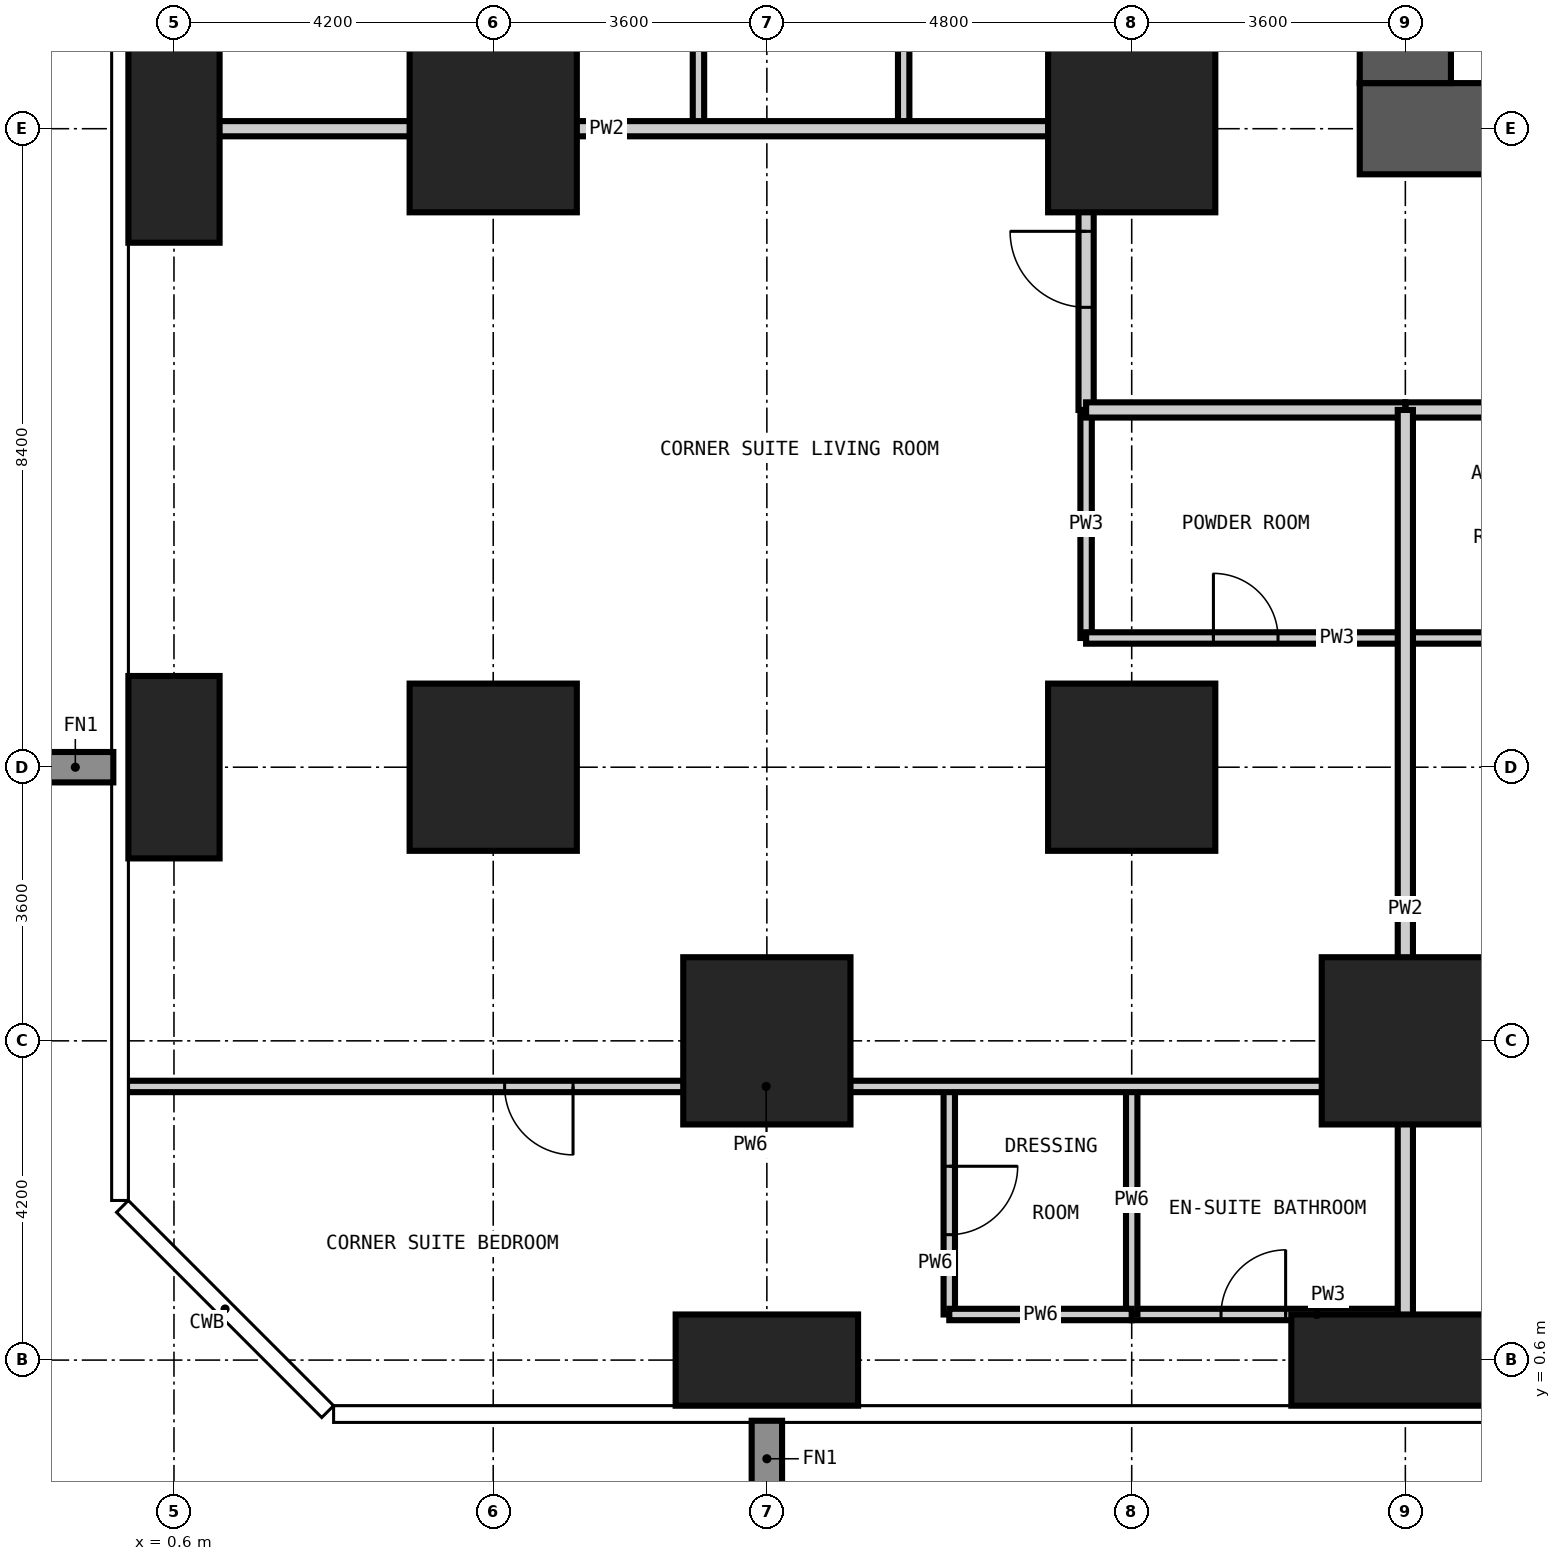
"""IFC4 building model, lengths in metres.
Left out: names, types, materials, properties, quantities, classifications, styles, units other than length and angle.
Written with IfcOpenShell. Run it as: python <this file> out.ifc"""

import sys

from ifc_helpers import new_model, si_unit, direction, frame, frame_2d, origin, origin_2d, place, context, subcontext, project, spatial, rectangle, extrude, element, fill, save


model = new_model("IFC4")
c1 = context("Model", 3, precision=1e-05, world=origin(), true_north=direction((0.0, 1.0)))
c2 = subcontext(c1, "Body", "Model", "MODEL_VIEW")
j1 = project(units=[si_unit("LENGTHUNIT", "METRE"), si_unit("PLANEANGLEUNIT", "RADIAN")], contexts=[c1])
p1 = place(None, origin())
s1 = spatial("IfcSite", under=j1, at=p1, CompositionType="ELEMENT")
p2 = place(p1, origin())
s2 = spatial("IfcBuilding", under=s1, at=p2, CompositionType="ELEMENT")
p3 = place(p2, frame((0.0, 0.0, 144.0)))
s3 = spatial("IfcBuildingStorey", under=s2, at=p3, CompositionType="ELEMENT", Elevation=144.0)
p4 = place(p3, frame((0.6, 8.4, -0.35), z_axis=(0.0, 0.0, 1.0), x_axis=(1.0, 0.0, 0.0)))
e1 = element("IfcColumn", 1, at=p4, inside=s3, PredefinedType="COLUMN", context=c2, shape_type="SweptSolid", body=[
    extrude(rectangle(XDim=1.2, YDim=2.4, at=origin_2d()), origin(), (0.0, 0.0, 1.0), 3.6),
])
p5 = place(p3, frame((0.6, 16.8, -0.35), z_axis=(0.0, 0.0, 1.0), x_axis=(1.0, 0.0, 0.0)))
e2 = element("IfcColumn", 2, at=p5, inside=s3, PredefinedType="COLUMN", context=c2, shape_type="SweptSolid", body=[
    extrude(rectangle(XDim=1.2, YDim=3.0, at=origin_2d()), origin(), (0.0, 0.0, 1.0), 3.6),
])
for number, where, z_axis, x_axis in (
    (3, (4.8, 8.4, -0.35), (0.0, 0.0, 1.0), (1.0, 0.0, 0.0)),
    (4, (4.8, 16.8, -0.35), (0.0, 0.0, 1.0), (1.0, 0.0, 0.0)),
):
    element("IfcColumn", number, at=place(p3, frame(where, z_axis=z_axis, x_axis=x_axis)), inside=s3, PredefinedType="COLUMN", context=c2, shape_type="SweptSolid", body=[
        extrude(rectangle(XDim=2.2, YDim=2.2, at=origin_2d()), origin(), (0.0, 0.0, 1.0), 3.6),
    ])
p6 = place(p3, frame((8.4, 0.6, -0.35), z_axis=(0.0, 0.0, 1.0), x_axis=(1.0, 0.0, 0.0)))
e5 = element("IfcColumn", 5, at=p6, inside=s3, PredefinedType="COLUMN", context=c2, shape_type="SweptSolid", body=[
    extrude(rectangle(XDim=2.4, YDim=1.2, at=origin_2d()), origin(), (0.0, 0.0, 1.0), 3.6),
])
for number, where, z_axis, x_axis in (
    (6, (8.4, 4.8, -0.35), (0.0, 0.0, 1.0), (1.0, 0.0, 0.0)),
    (7, (13.2, 8.4, -0.35), (0.0, 0.0, 1.0), (1.0, 0.0, 0.0)),
    (8, (13.2, 16.8, -0.35), (0.0, 0.0, 1.0), (1.0, 0.0, 0.0)),
):
    element("IfcColumn", number, at=place(p3, frame(where, z_axis=z_axis, x_axis=x_axis)), inside=s3, PredefinedType="COLUMN", context=c2, shape_type="SweptSolid", body=[
        extrude(rectangle(XDim=2.2, YDim=2.2, at=origin_2d()), origin(), (0.0, 0.0, 1.0), 3.6),
    ])
p7 = place(p3, frame((16.8, 0.6, -0.35), z_axis=(0.0, 0.0, 1.0), x_axis=(1.0, 0.0, 0.0)))
e9 = element("IfcColumn", 9, at=p7, inside=s3, PredefinedType="COLUMN", context=c2, shape_type="SweptSolid", body=[
    extrude(rectangle(XDim=3.0, YDim=1.2, at=origin_2d()), origin(), (0.0, 0.0, 1.0), 3.6),
])
p8 = place(p3, frame((16.8, 4.8, -0.35), z_axis=(0.0, 0.0, 1.0), x_axis=(1.0, 0.0, 0.0)))
e10 = element("IfcColumn", 10, at=p8, inside=s3, PredefinedType="COLUMN", context=c2, shape_type="SweptSolid", body=[
    extrude(rectangle(XDim=2.2, YDim=2.2, at=origin_2d()), origin(), (0.0, 0.0, 1.0), 3.6),
])
p9 = place(p3, frame((16.2, 16.8, -0.35), z_axis=(0.0, 0.0, 1.0), x_axis=(1.0, 0.0, 0.0)))
e11 = element("IfcWall", 11, at=p9, inside=s3, PredefinedType="SHEAR", context=c2, shape_type="SweptSolid", body=[
    extrude(rectangle(XDim=26.4, YDim=1.2, at=frame_2d((13.2, 0.0))), origin(), (0.0, 0.0, 1.0), 3.6),
])
p10 = place(p9, frame((12.7, 0.0, 0.35)))
e12 = element("IfcOpeningElement", 12, at=p10, cuts=e11, PredefinedType="OPENING", context=c2, shape_type="SweptSolid", body=[
    extrude(rectangle(XDim=1.0, YDim=2.1, at=frame_2d((0.5, 1.05))), frame((0.0, 0.61, 0.0), z_axis=(0.0, -1.0, 0.0), x_axis=(1.0, 0.0, 0.0)), (0.0, 0.0, 1.0), 1.22),
])
p11 = place(p9, frame((19.0, 0.0, 0.35)))
e13 = element("IfcOpeningElement", 13, at=p11, cuts=e11, PredefinedType="OPENING", context=c2, shape_type="SweptSolid", body=[
    extrude(rectangle(XDim=1.0, YDim=2.1, at=frame_2d((0.5, 1.05))), frame((0.0, 0.61, 0.0), z_axis=(0.0, -1.0, 0.0), x_axis=(1.0, 0.0, 0.0)), (0.0, 0.0, 1.0), 1.22),
])
p12 = place(p3, frame((16.8, 41.4, -0.35), z_axis=(0.0, 0.0, 1.0), x_axis=(0.0, -1.0, 0.0)))
e14 = element("IfcWall", 14, at=p12, inside=s3, PredefinedType="SHEAR", context=c2, shape_type="SweptSolid", body=[
    extrude(rectangle(XDim=24.0, YDim=1.2, at=frame_2d((12.0, 0.0))), origin(), (0.0, 0.0, 1.0), 3.6),
])
p13 = place(p12, frame((11.1, 0.0, 0.35)))
e15 = element("IfcOpeningElement", 15, at=p13, cuts=e14, PredefinedType="OPENING", context=c2, shape_type="SweptSolid", body=[
    extrude(rectangle(XDim=1.8, YDim=2.2, at=frame_2d((0.9, 1.1))), frame((0.0, 0.61, 0.0), z_axis=(0.0, -1.0, 0.0), x_axis=(1.0, 0.0, 0.0)), (0.0, 0.0, 1.0), 1.22),
])
p14 = place(p12, frame((19.9, 0.0, 0.35)))
e16 = element("IfcOpeningElement", 16, at=p14, cuts=e14, PredefinedType="OPENING", context=c2, shape_type="SweptSolid", body=[
    extrude(rectangle(XDim=1.0, YDim=2.1, at=frame_2d((0.5, 1.05))), frame((0.0, 0.61, 0.0), z_axis=(0.0, -1.0, 0.0), x_axis=(1.0, 0.0, 0.0)), (0.0, 0.0, 1.0), 1.22),
])
p15 = place(p12, frame((5.2, 0.0, 0.35)))
e17 = element("IfcOpeningElement", 17, at=p15, cuts=e14, PredefinedType="OPENING", context=c2, shape_type="SweptSolid", body=[
    extrude(rectangle(XDim=1.0, YDim=2.1, at=frame_2d((0.5, 1.05))), frame((0.0, 0.61, 0.0), z_axis=(0.0, -1.0, 0.0), x_axis=(1.0, 0.0, 0.0)), (0.0, 0.0, 1.0), 1.22),
])
p16 = place(p3, frame((7.5, 16.8, 0.0), z_axis=(0.0, 0.0, 1.0), x_axis=(0.0, 1.0, 0.0)))
e18 = element("IfcWall", 18, at=p16, inside=s3, PredefinedType="PARTITIONING", context=c2, shape_type="SweptSolid", body=[
    extrude(rectangle(XDim=3.0, YDim=0.15, at=frame_2d((1.5, 0.0))), origin(), (0.0, 0.0, 1.0), 3.25),
])
p17 = place(p3, frame((10.2, 16.8, 0.0), z_axis=(0.0, 0.0, 1.0), x_axis=(0.0, 1.0, 0.0)))
e19 = element("IfcWall", 19, at=p17, inside=s3, PredefinedType="PARTITIONING", context=c2, shape_type="SweptSolid", body=[
    extrude(rectangle(XDim=3.0, YDim=0.15, at=frame_2d((1.5, 0.0))), origin(), (0.0, 0.0, 1.0), 3.25),
])
p18 = place(p17, frame((1.075, 0.0, 0.0)))
e20 = element("IfcOpeningElement", 20, at=p18, cuts=e19, PredefinedType="OPENING", context=c2, shape_type="SweptSolid", body=[
    extrude(rectangle(XDim=0.85, YDim=2.1, at=frame_2d((0.425, 1.05))), frame((0.0, 0.085, 0.0), z_axis=(0.0, -1.0, 0.0), x_axis=(1.0, 0.0, 0.0)), (0.0, 0.0, 1.0), 0.17),
])
p19 = place(p3, frame((12.6, 10.1, 0.0), z_axis=(0.0, 0.0, 1.0), x_axis=(0.0, 1.0, 0.0)))
e21 = element("IfcWall", 21, at=p19, inside=s3, PredefinedType="PARTITIONING", context=c2, shape_type="SweptSolid", body=[
    extrude(rectangle(XDim=3.0, YDim=0.15, at=frame_2d((1.5, 0.0))), origin(), (0.0, 0.0, 1.0), 3.25),
])
p20 = place(p3, frame((13.2, 1.2, 0.0), z_axis=(0.0, 0.0, 1.0), x_axis=(1.0, 0.0, 0.0)))
e22 = element("IfcWall", 22, at=p20, inside=s3, PredefinedType="PARTITIONING", context=c2, shape_type="SweptSolid", body=[
    extrude(rectangle(XDim=3.6, YDim=0.15, at=frame_2d((1.8, 0.0))), origin(), (0.0, 0.0, 1.0), 3.25),
])
p21 = place(p20, frame((1.175, 0.0, 0.0)))
e23 = element("IfcOpeningElement", 23, at=p21, cuts=e22, PredefinedType="OPENING", context=c2, shape_type="SweptSolid", body=[
    extrude(rectangle(XDim=0.85, YDim=2.1, at=frame_2d((0.425, 1.05))), frame((0.0, 0.085, 0.0), z_axis=(0.0, -1.0, 0.0), x_axis=(1.0, 0.0, 0.0)), (0.0, 0.0, 1.0), 0.17),
])
p22 = place(p3, frame((12.6, 10.1, 0.0), z_axis=(0.0, 0.0, 1.0), x_axis=(1.0, 0.0, 0.0)))
e24 = element("IfcWall", 24, at=p22, inside=s3, PredefinedType="PARTITIONING", context=c2, shape_type="SweptSolid", body=[
    extrude(rectangle(XDim=6.6, YDim=0.15, at=frame_2d((3.3, 0.0))), origin(), (0.0, 0.0, 1.0), 3.25),
])
p23 = place(p22, frame((1.675, 0.0, 0.0)))
e25 = element("IfcOpeningElement", 25, at=p23, cuts=e24, PredefinedType="OPENING", context=c2, shape_type="SweptSolid", body=[
    extrude(rectangle(XDim=0.85, YDim=2.1, at=frame_2d((0.425, 1.05))), frame((0.0, 0.085, 0.0), z_axis=(0.0, -1.0, 0.0), x_axis=(1.0, 0.0, 0.0)), (0.0, 0.0, 1.0), 0.17),
])
p24 = place(p3, frame((12.6, 13.1, 0.0), z_axis=(0.0, 0.0, 1.0), x_axis=(0.0, 1.0, 0.0)))
e26 = element("IfcWall", 26, at=p24, inside=s3, PredefinedType="PARTITIONING", context=c2, shape_type="SweptSolid", body=[
    extrude(rectangle(XDim=31.4, YDim=0.2, at=frame_2d((15.7, 0.0))), origin(), (0.0, 0.0, 1.0), 3.25),
])
p25 = place(p24, frame((5.3, 0.0, 0.0)))
e27 = element("IfcOpeningElement", 27, at=p25, cuts=e26, PredefinedType="OPENING", context=c2, shape_type="SweptSolid", body=[
    extrude(rectangle(XDim=1.0, YDim=2.2, at=frame_2d((0.5, 1.1))), frame((0.0, 0.11, 0.0), z_axis=(0.0, -1.0, 0.0), x_axis=(1.0, 0.0, 0.0)), (0.0, 0.0, 1.0), 0.22),
])
p26 = place(p24, frame((13.3, 0.0, 0.0)))
e28 = element("IfcOpeningElement", 28, at=p26, cuts=e26, PredefinedType="OPENING", context=c2, shape_type="SweptSolid", body=[
    extrude(rectangle(XDim=1.0, YDim=2.2, at=frame_2d((0.5, 1.1))), frame((0.0, 0.11, 0.0), z_axis=(0.0, -1.0, 0.0), x_axis=(1.0, 0.0, 0.0)), (0.0, 0.0, 1.0), 0.22),
])
p27 = place(p24, frame((18.3, 0.0, 0.0)))
e29 = element("IfcOpeningElement", 29, at=p27, cuts=e26, PredefinedType="OPENING", context=c2, shape_type="SweptSolid", body=[
    extrude(rectangle(XDim=1.0, YDim=2.2, at=frame_2d((0.5, 1.1))), frame((0.0, 0.11, 0.0), z_axis=(0.0, -1.0, 0.0), x_axis=(1.0, 0.0, 0.0)), (0.0, 0.0, 1.0), 0.22),
])
p28 = place(p24, frame((26.3, 0.0, 0.0)))
e30 = element("IfcOpeningElement", 30, at=p28, cuts=e26, PredefinedType="OPENING", context=c2, shape_type="SweptSolid", body=[
    extrude(rectangle(XDim=1.0, YDim=2.2, at=frame_2d((0.5, 1.1))), frame((0.0, 0.11, 0.0), z_axis=(0.0, -1.0, 0.0), x_axis=(1.0, 0.0, 0.0)), (0.0, 0.0, 1.0), 0.22),
])
p29 = place(p24, frame((1.35, 0.0, 0.0)))
e31 = element("IfcOpeningElement", 31, at=p29, cuts=e26, PredefinedType="OPENING", context=c2, shape_type="SweptSolid", body=[
    extrude(rectangle(XDim=1.0, YDim=2.2, at=frame_2d((0.5, 1.1))), frame((0.0, 0.11, 0.0), z_axis=(0.0, -1.0, 0.0), x_axis=(1.0, 0.0, 0.0)), (0.0, 0.0, 1.0), 0.22),
])
p30 = place(p24, frame((30.05, 0.0, 0.0)))
e32 = element("IfcOpeningElement", 32, at=p30, cuts=e26, PredefinedType="OPENING", context=c2, shape_type="SweptSolid", body=[
    extrude(rectangle(XDim=1.0, YDim=2.2, at=frame_2d((0.5, 1.1))), frame((0.0, 0.11, 0.0), z_axis=(0.0, -1.0, 0.0), x_axis=(1.0, 0.0, 0.0)), (0.0, 0.0, 1.0), 0.22),
])
p31 = place(p3, frame((16.8, 13.1, 0.0), z_axis=(0.0, 0.0, 1.0), x_axis=(1.0, 0.0, 0.0)))
e33 = element("IfcWall", 33, at=p31, inside=s3, PredefinedType="PARTITIONING", context=c2, shape_type="SweptSolid", body=[
    extrude(rectangle(XDim=4.2, YDim=0.2, at=frame_2d((2.1, 0.0))), origin(), (0.0, 0.0, 1.0), 3.25),
])
p32 = place(p31, frame((2.8, 0.0, 0.0)))
e34 = element("IfcOpeningElement", 34, at=p32, cuts=e33, PredefinedType="OPENING", context=c2, shape_type="SweptSolid", body=[
    extrude(rectangle(XDim=1.0, YDim=2.2, at=frame_2d((0.5, 1.1))), frame((0.0, 0.11, 0.0), z_axis=(0.0, -1.0, 0.0), x_axis=(1.0, 0.0, 0.0)), (0.0, 0.0, 1.0), 0.22),
])
p33 = place(p3, frame((16.8, 13.1, 0.0), z_axis=(0.0, 0.0, 1.0), x_axis=(-1.0, 0.0, 0.0)))
e35 = element("IfcWall", 35, at=p33, inside=s3, PredefinedType="PARTITIONING", context=c2, shape_type="SweptSolid", body=[
    extrude(rectangle(XDim=4.2, YDim=0.2, at=frame_2d((2.1, 0.0))), origin(), (0.0, 0.0, 1.0), 3.25),
])
p34 = place(p3, frame((16.8, -0.018, 0.0), z_axis=(0.0, 0.0, 1.0), x_axis=(0.0, 1.0, 0.0)))
e36 = element("IfcWall", 36, at=p34, inside=s3, PredefinedType="PARTITIONING", context=c2, shape_type="SweptSolid", body=[
    extrude(rectangle(XDim=13.118, YDim=0.2, at=frame_2d((6.559, 0.0))), origin(), (0.0, 0.0, 1.0), 3.25),
])
p35 = place(p3, frame((-0.018, 16.8, 0.0), z_axis=(0.0, 0.0, 1.0), x_axis=(1.0, 0.0, 0.0)))
e37 = element("IfcWall", 37, at=p35, inside=s3, PredefinedType="PARTITIONING", context=c2, shape_type="SweptSolid", body=[
    extrude(rectangle(XDim=12.618, YDim=0.2, at=frame_2d((6.309, 0.0))), origin(), (0.0, 0.0, 1.0), 3.25),
])
p36 = place(p3, frame((10.8, 1.2, 0.0), z_axis=(0.0, 0.0, 1.0), x_axis=(0.0, 1.0, 0.0)))
e38 = element("IfcWall", 38, at=p36, inside=s3, PredefinedType="PARTITIONING", context=c2, shape_type="SweptSolid", body=[
    extrude(rectangle(XDim=3.0, YDim=0.15, at=frame_2d((1.5, 0.0))), origin(), (0.0, 0.0, 1.0), 3.25),
])
p37 = place(p36, frame((1.05, 0.0, 0.0)))
e39 = element("IfcOpeningElement", 39, at=p37, cuts=e38, PredefinedType="OPENING", context=c2, shape_type="SweptSolid", body=[
    extrude(rectangle(XDim=0.9, YDim=2.1, at=frame_2d((0.45, 1.05))), frame((0.0, 0.085, 0.0), z_axis=(0.0, -1.0, 0.0), x_axis=(1.0, 0.0, 0.0)), (0.0, 0.0, 1.0), 0.17),
])
p38 = place(p3, frame((13.2, 1.2, 0.0), z_axis=(0.0, 0.0, 1.0), x_axis=(0.0, 1.0, 0.0)))
e40 = element("IfcWall", 40, at=p38, inside=s3, PredefinedType="PARTITIONING", context=c2, shape_type="SweptSolid", body=[
    extrude(rectangle(XDim=3.0, YDim=0.15, at=frame_2d((1.5, 0.0))), origin(), (0.0, 0.0, 1.0), 3.25),
])
p39 = place(p3, frame((10.8, 1.2, 0.0), z_axis=(0.0, 0.0, 1.0), x_axis=(1.0, 0.0, 0.0)))
e41 = element("IfcWall", 41, at=p39, inside=s3, PredefinedType="PARTITIONING", context=c2, shape_type="SweptSolid", body=[
    extrude(rectangle(XDim=2.4, YDim=0.15, at=frame_2d((1.2, 0.0))), origin(), (0.0, 0.0, 1.0), 3.25),
])
p40 = place(p3, frame((-0.018, 4.2, 0.0), z_axis=(0.0, 0.0, 1.0), x_axis=(1.0, 0.0, 0.0)))
e42 = element("IfcWall", 42, at=p40, inside=s3, PredefinedType="PARTITIONING", context=c2, shape_type="SweptSolid", body=[
    extrude(rectangle(XDim=16.818, YDim=0.15, at=frame_2d((8.409, 0.0))), origin(), (0.0, 0.0, 1.0), 3.25),
])
p41 = place(p40, frame((4.968, 0.0, 0.0)))
e43 = element("IfcOpeningElement", 43, at=p41, cuts=e42, PredefinedType="OPENING", context=c2, shape_type="SweptSolid", body=[
    extrude(rectangle(XDim=0.9, YDim=2.1, at=frame_2d((0.45, 1.05))), frame((0.0, 0.085, 0.0), z_axis=(0.0, -1.0, 0.0), x_axis=(1.0, 0.0, 0.0)), (0.0, 0.0, 1.0), 0.17),
])
p42 = place(p29, origin())
e44 = element("IfcDoor", 44, at=p42, inside=s3, OperationType="SINGLE_SWING_RIGHT", PredefinedType="DOOR", context=c2, shape_type="SweptSolid", body=[
    extrude(rectangle(XDim=1.0, YDim=2.2, at=frame_2d((0.5, 1.1))), frame((0.0, 0.025, 0.0), z_axis=(0.0, -1.0, 0.0), x_axis=(1.0, 0.0, 0.0)), (0.0, 0.0, 1.0), 0.05),
])
fill(e31, e44)
p43 = place(p23, origin())
e45 = element("IfcDoor", 45, at=p43, inside=s3, OperationType="SINGLE_SWING_LEFT", PredefinedType="DOOR", context=c2, shape_type="SweptSolid", body=[
    extrude(rectangle(XDim=0.85, YDim=2.1, at=frame_2d((0.425, 1.05))), frame((0.0, 0.025, 0.0), z_axis=(0.0, -1.0, 0.0), x_axis=(1.0, 0.0, 0.0)), (0.0, 0.0, 1.0), 0.05),
])
fill(e25, e45)
p44 = place(p41, frame((0.9, 0.0, 0.0), z_axis=(0.0, 0.0, 1.0), x_axis=(-1.0, 0.0, 0.0)))
e46 = element("IfcDoor", 46, at=p44, inside=s3, OperationType="SINGLE_SWING_LEFT", PredefinedType="DOOR", context=c2, shape_type="SweptSolid", body=[
    extrude(rectangle(XDim=0.9, YDim=2.1, at=frame_2d((0.45, 1.05))), frame((0.0, 0.025, 0.0), z_axis=(0.0, -1.0, 0.0), x_axis=(1.0, 0.0, 0.0)), (0.0, 0.0, 1.0), 0.05),
])
fill(e43, e46)
p45 = place(p21, origin())
e47 = element("IfcDoor", 47, at=p45, inside=s3, OperationType="SINGLE_SWING_RIGHT", PredefinedType="DOOR", context=c2, shape_type="SweptSolid", body=[
    extrude(rectangle(XDim=0.85, YDim=2.1, at=frame_2d((0.425, 1.05))), frame((0.0, 0.025, 0.0), z_axis=(0.0, -1.0, 0.0), x_axis=(1.0, 0.0, 0.0)), (0.0, 0.0, 1.0), 0.05),
])
fill(e23, e47)
p46 = place(p37, frame((0.9, 0.0, 0.0), z_axis=(0.0, 0.0, 1.0), x_axis=(-1.0, 0.0, 0.0)))
e48 = element("IfcDoor", 48, at=p46, inside=s3, OperationType="SINGLE_SWING_LEFT", PredefinedType="DOOR", context=c2, shape_type="SweptSolid", body=[
    extrude(rectangle(XDim=0.9, YDim=2.1, at=frame_2d((0.45, 1.05))), frame((0.0, 0.025, 0.0), z_axis=(0.0, -1.0, 0.0), x_axis=(1.0, 0.0, 0.0)), (0.0, 0.0, 1.0), 0.05),
])
fill(e39, e48)
save(model, sys.argv[1])
